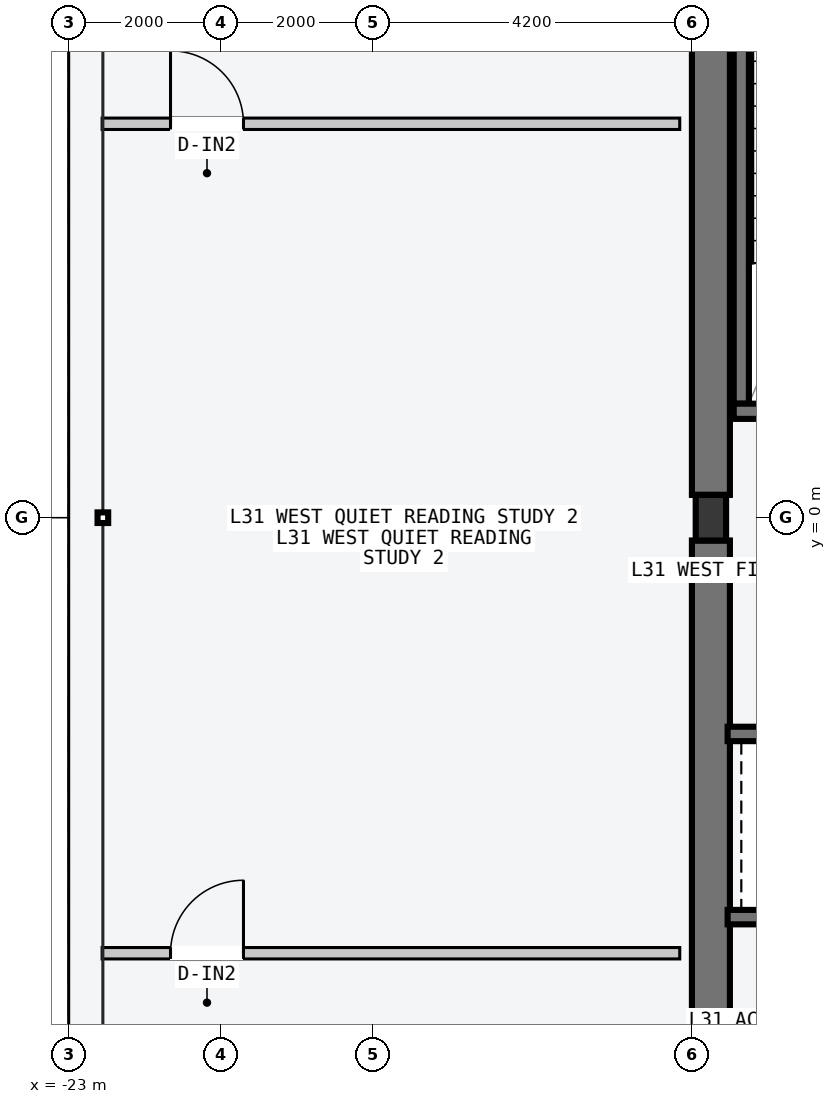
"""IFC4 building model, lengths in metres.
Left out: names, types, materials, properties, quantities, classifications, styles, units other than length and angle.
Written with IfcOpenShell. Run it as: python <this file> out.ifc"""

import sys

from ifc_helpers import new_model, si_unit, direction, frame, frame_2d, origin, origin_2d, place, context, subcontext, project, spatial, rectangle, i_section, extrude, element, fill, save


model = new_model("IFC4")
c1 = context("Model", 3, precision=1e-05, world=origin(), true_north=direction((0.0, 1.0)))
c2 = subcontext(c1, "Body", "Model", "MODEL_VIEW")
j1 = project(units=[si_unit("LENGTHUNIT", "METRE"), si_unit("PLANEANGLEUNIT", "RADIAN")], contexts=[c1])
p1 = place(None, origin())
s1 = spatial("IfcSite", under=j1, at=p1, CompositionType="ELEMENT")
p2 = place(p1, origin())
s2 = spatial("IfcBuilding", under=s1, at=p2, CompositionType="ELEMENT")
p3 = place(p2, frame((0.0, 0.0, 120.6)))
s3 = spatial("IfcBuildingStorey", under=s2, at=p3, CompositionType="ELEMENT", Elevation=120.6)
for number, where, z_axis, x_axis in (
    (1, (-14.55, -9.45, -0.2), (0.0, 0.0, 1.0), (0.0, 1.0, 0.0)),
    (2, (-14.55, 0.3, -0.2), (0.0, 0.0, 1.0), (0.0, 1.0, 0.0)),
):
    element("IfcWall", number, at=place(p3, frame(where, z_axis=z_axis, x_axis=x_axis)), inside=s3, PredefinedType="SHEAR", context=c2, shape_type="SweptSolid", body=[
        extrude(rectangle(XDim=9.15, YDim=0.5, at=frame_2d((4.575, 0.0))), origin(), (0.0, 0.0, 1.0), 3.6),
    ])
p4 = place(p3, frame((-14.15, 1.5, -0.2), z_axis=(0.0, 0.0, 1.0), x_axis=(0.0, 1.0, 0.0)))
e3 = element("IfcWall", 3, at=p4, inside=s3, PredefinedType="SOLIDWALL", context=c2, shape_type="SweptSolid", body=[
    extrude(rectangle(XDim=7.8, YDim=0.2, at=frame_2d((3.9, 0.0))), origin(), (0.0, 0.0, 1.0), 3.6),
])
p5 = place(p3, frame((-14.25, 1.4, -0.2), z_axis=(0.0, 0.0, 1.0), x_axis=(1.0, 0.0, 0.0)))
e4 = element("IfcWall", 4, at=p5, inside=s3, PredefinedType="SOLIDWALL", context=c2, shape_type="SweptSolid", body=[
    extrude(rectangle(XDim=3.72, YDim=0.2, at=frame_2d((1.86, 0.0))), origin(), (0.0, 0.0, 1.0), 3.6),
])
p6 = place(p5, frame((1.5, 0.0, 0.2)))
e5 = element("IfcOpeningElement", 5, at=p6, cuts=e4, PredefinedType="OPENING", context=c2, shape_type="SweptSolid", body=[
    extrude(rectangle(XDim=1.12, YDim=2.18, at=frame_2d((0.56, 1.09))), frame((0.0, 0.11, 0.0), z_axis=(0.0, -1.0, 0.0), x_axis=(1.0, 0.0, 0.0)), (0.0, 0.0, 1.0), 0.22),
])
p7 = place(p3, frame((-14.55, 0.0, 0.0), z_axis=(0.0, 0.0, 1.0), x_axis=(1.0, 0.0, 0.0)))
e6 = element("IfcColumn", 6, at=p7, inside=s3, PredefinedType="COLUMN", context=c2, shape_type="SweptSolid", body=[
    extrude(i_section(OverallWidth=0.4, OverallDepth=0.6, WebThickness=0.022, FlangeThickness=0.036, at=origin_2d()), origin(), (0.0, 0.0, 1.0), 3.6),
])
p8 = place(p3, frame((-14.33, -2.845, -0.2), z_axis=(0.0, 0.0, 1.0), x_axis=(1.0, 0.0, 0.0)))
e7 = element("IfcWall", 7, at=p8, inside=s3, PredefinedType="SOLIDWALL", context=c2, shape_type="SweptSolid", body=[
    extrude(rectangle(XDim=2.68, YDim=0.19, at=frame_2d((1.34, 0.0))), origin(), (0.0, 0.0, 1.0), 3.6),
])
p9 = place(p8, frame((0.83, 0.0, 0.2)))
e8 = element("IfcOpeningElement", 8, at=p9, cuts=e7, PredefinedType="OPENING", context=c2, shape_type="SweptSolid", body=[
    extrude(rectangle(XDim=1.2, YDim=2.2, at=frame_2d((0.6, 1.1))), frame((0.0, 0.105, 0.0), z_axis=(0.0, -1.0, 0.0), x_axis=(1.0, 0.0, 0.0)), (0.0, 0.0, 1.0), 0.21),
])
p10 = place(p3, frame((-14.33, -5.255, -0.2), z_axis=(0.0, 0.0, 1.0), x_axis=(1.0, 0.0, 0.0)))
e9 = element("IfcWall", 9, at=p10, inside=s3, PredefinedType="SOLIDWALL", context=c2, shape_type="SweptSolid", body=[
    extrude(rectangle(XDim=2.68, YDim=0.19, at=frame_2d((1.34, 0.0))), origin(), (0.0, 0.0, 1.0), 3.6),
])
p11 = place(p3, frame((-22.56, -5.73, 0.0), z_axis=(0.0, 0.0, 1.0), x_axis=(1.0, 0.0, 0.0)))
e10 = element("IfcWall", 10, at=p11, inside=s3, PredefinedType="PARTITIONING", context=c2, shape_type="SweptSolid", body=[
    extrude(rectangle(XDim=7.6, YDim=0.15, at=frame_2d((3.8, 0.0))), origin(), (0.0, 0.0, 1.0), 3.4),
])
p12 = place(p11, frame((0.9, 0.0, 0.0)))
e11 = element("IfcOpeningElement", 11, at=p12, cuts=e10, PredefinedType="OPENING", context=c2, shape_type="SweptSolid", body=[
    extrude(rectangle(XDim=0.96, YDim=2.18, at=frame_2d((0.48, 1.09))), frame((0.0, 0.085, 0.0), z_axis=(0.0, -1.0, 0.0), x_axis=(1.0, 0.0, 0.0)), (0.0, 0.0, 1.0), 0.17),
])
p13 = place(p3, frame((-22.56, 5.183, 0.0), z_axis=(0.0, 0.0, 1.0), x_axis=(1.0, 0.0, 0.0)))
e12 = element("IfcWall", 12, at=p13, inside=s3, PredefinedType="PARTITIONING", context=c2, shape_type="SweptSolid", body=[
    extrude(rectangle(XDim=7.6, YDim=0.15, at=frame_2d((3.8, 0.0))), origin(), (0.0, 0.0, 1.0), 3.4),
])
p14 = place(p13, frame((0.9, 0.0, 0.0)))
e13 = element("IfcOpeningElement", 13, at=p14, cuts=e12, PredefinedType="OPENING", context=c2, shape_type="SweptSolid", body=[
    extrude(rectangle(XDim=0.96, YDim=2.18, at=frame_2d((0.48, 1.09))), frame((0.0, 0.085, 0.0), z_axis=(0.0, -1.0, 0.0), x_axis=(1.0, 0.0, 0.0)), (0.0, 0.0, 1.0), 0.17),
])
p15 = place(p12, origin())
e14 = element("IfcDoor", 14, at=p15, inside=s3, OperationType="SINGLE_SWING_RIGHT", PredefinedType="DOOR", context=c2, shape_type="SweptSolid", body=[
    extrude(rectangle(XDim=0.96, YDim=2.18, at=frame_2d((0.48, 1.09))), frame((0.0, 0.025, 0.0), z_axis=(0.0, -1.0, 0.0), x_axis=(1.0, 0.0, 0.0)), (0.0, 0.0, 1.0), 0.05),
])
fill(e11, e14)
p16 = place(p14, origin())
e15 = element("IfcDoor", 15, at=p16, inside=s3, OperationType="SINGLE_SWING_LEFT", PredefinedType="DOOR", context=c2, shape_type="SweptSolid", body=[
    extrude(rectangle(XDim=0.96, YDim=2.18, at=frame_2d((0.48, 1.09))), frame((0.0, 0.025, 0.0), z_axis=(0.0, -1.0, 0.0), x_axis=(1.0, 0.0, 0.0)), (0.0, 0.0, 1.0), 0.05),
])
fill(e13, e15)
save(model, sys.argv[1])
